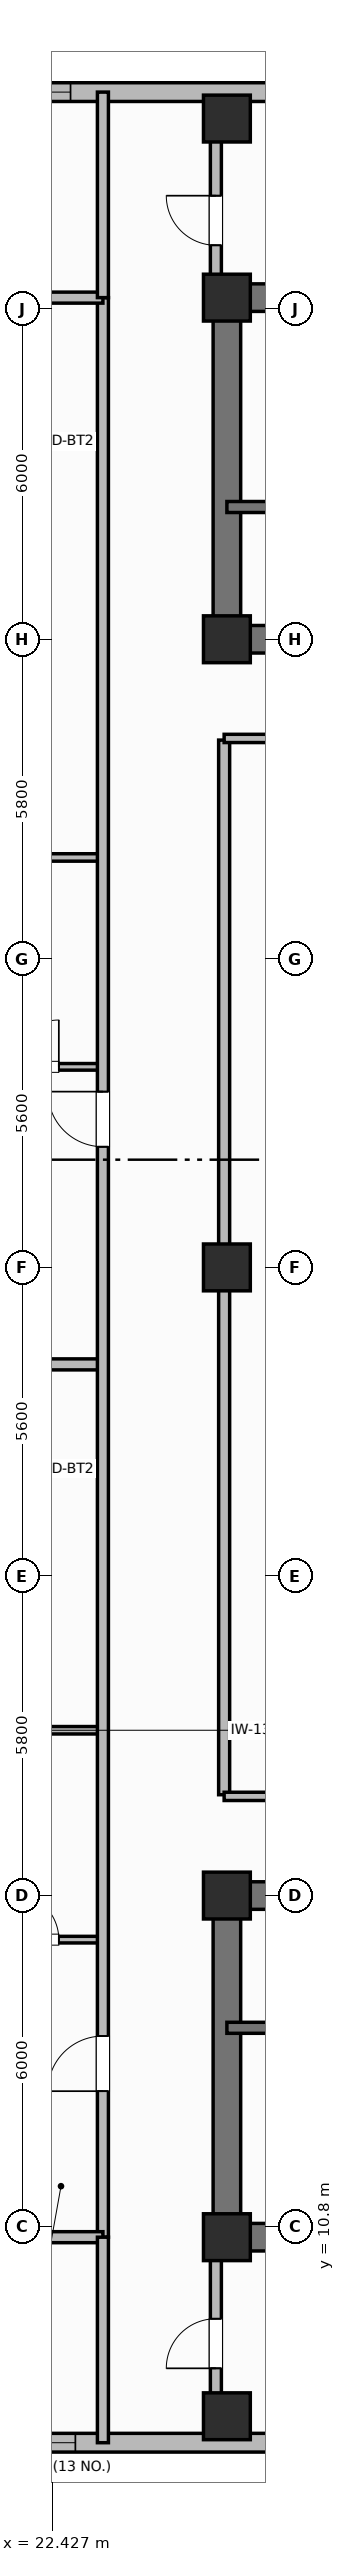
"""IFC4 building model, lengths in metres.
Left out: names, types, materials, properties, quantities, classifications, styles, units other than length and angle.
Written with IfcOpenShell. Run it as: python <this file> out.ifc"""

import sys

from ifc_helpers import new_model, si_unit, direction, frame, frame_2d, origin, origin_2d, place, context, subcontext, project, spatial, rectangle, extrude, element, fill, save


model = new_model("IFC4")
c1 = context("Model", 3, precision=1e-05, world=origin(), true_north=direction((0.0, 1.0)))
c2 = subcontext(c1, "Body", "Model", "MODEL_VIEW")
j1 = project(units=[si_unit("LENGTHUNIT", "METRE"), si_unit("PLANEANGLEUNIT", "RADIAN")], contexts=[c1])
p1 = place(None, origin())
s1 = spatial("IfcSite", under=j1, at=p1, CompositionType="ELEMENT")
p2 = place(p1, origin())
s2 = spatial("IfcBuilding", under=s1, at=p2, CompositionType="ELEMENT")
p3 = place(p2, frame((0.0, 0.0, 214.7)))
s3 = spatial("IfcBuildingStorey", under=s2, at=p3, CompositionType="ELEMENT", Elevation=214.7)
p4 = place(p3, frame((52.8, 10.6, 0.0), z_axis=(0.0, 0.0, 1.0), x_axis=(-1.0, 0.0, 0.0)))
e1 = element("IfcWall", 1, at=p4, inside=s3, PredefinedType="SHEAR", context=c2, shape_type="SweptSolid", body=[
    extrude(rectangle(XDim=27.2, YDim=0.5, at=frame_2d((13.6, 0.0))), origin(), (0.0, 0.0, 1.0), 3.7),
])
p5 = place(p3, frame((25.6, 10.85, 0.0), z_axis=(0.0, 0.0, 1.0), x_axis=(0.0, 1.0, 0.0)))
e2 = element("IfcWall", 2, at=p5, inside=s3, PredefinedType="SHEAR", context=c2, shape_type="SweptSolid", body=[
    extrude(rectangle(XDim=5.7, YDim=0.5, at=frame_2d((2.85, 0.0))), origin(), (0.0, 0.0, 1.0), 3.7),
])
p6 = place(p3, frame((25.6, 16.8, 0.0), z_axis=(0.0, 0.0, 1.0), x_axis=(1.0, 0.0, 0.0)))
e3 = element("IfcWall", 3, at=p6, inside=s3, PredefinedType="SHEAR", context=c2, shape_type="SweptSolid", body=[
    extrude(rectangle(XDim=27.2, YDim=0.5, at=frame_2d((13.6, 0.0))), origin(), (0.0, 0.0, 1.0), 3.7),
])
p7 = place(p6, frame((1.9, 0.0, 0.0)))
e4 = element("IfcOpeningElement", 4, at=p7, cuts=e3, PredefinedType="OPENING", context=c2, shape_type="SweptSolid", body=[
    extrude(rectangle(XDim=1.1, YDim=2.15, at=frame_2d((0.55, 1.075))), frame((0.0, 0.26, 0.0), z_axis=(0.0, -1.0, 0.0), x_axis=(1.0, 0.0, 0.0)), (0.0, 0.0, 1.0), 0.52),
])
p8 = place(p6, frame((13.0, 0.0, 0.0)))
e5 = element("IfcOpeningElement", 5, at=p8, cuts=e3, PredefinedType="OPENING", context=c2, shape_type="SweptSolid", body=[
    extrude(rectangle(XDim=1.2, YDim=2.15, at=frame_2d((0.6, 1.075))), frame((0.0, 0.26, 0.0), z_axis=(0.0, -1.0, 0.0), x_axis=(1.0, 0.0, 0.0)), (0.0, 0.0, 1.0), 0.52),
])
p9 = place(p6, frame((21.6, 0.0, 0.0)))
e6 = element("IfcOpeningElement", 6, at=p9, cuts=e3, PredefinedType="OPENING", context=c2, shape_type="SweptSolid", body=[
    extrude(rectangle(XDim=1.0, YDim=2.15, at=frame_2d((0.5, 1.075))), frame((0.0, 0.26, 0.0), z_axis=(0.0, -1.0, 0.0), x_axis=(1.0, 0.0, 0.0)), (0.0, 0.0, 1.0), 0.52),
])
p10 = place(p3, frame((25.6, 45.8, 0.0), z_axis=(0.0, 0.0, 1.0), x_axis=(1.0, 0.0, 0.0)))
e7 = element("IfcWall", 7, at=p10, inside=s3, PredefinedType="SHEAR", context=c2, shape_type="SweptSolid", body=[
    extrude(rectangle(XDim=27.2, YDim=0.5, at=frame_2d((13.6, 0.0))), origin(), (0.0, 0.0, 1.0), 3.7),
])
p11 = place(p3, frame((25.6, 39.85, 0.0), z_axis=(0.0, 0.0, 1.0), x_axis=(0.0, 1.0, 0.0)))
e8 = element("IfcWall", 8, at=p11, inside=s3, PredefinedType="SHEAR", context=c2, shape_type="SweptSolid", body=[
    extrude(rectangle(XDim=5.7, YDim=0.5, at=frame_2d((2.85, 0.0))), origin(), (0.0, 0.0, 1.0), 3.7),
])
p12 = place(p3, frame((52.8, 39.6, 0.0), z_axis=(0.0, 0.0, 1.0), x_axis=(-1.0, 0.0, 0.0)))
e9 = element("IfcWall", 9, at=p12, inside=s3, PredefinedType="SHEAR", context=c2, shape_type="SweptSolid", body=[
    extrude(rectangle(XDim=27.2, YDim=0.5, at=frame_2d((13.6, 0.0))), origin(), (0.0, 0.0, 1.0), 3.7),
])
p13 = place(p12, frame((24.2, 0.0, 0.0)))
e10 = element("IfcOpeningElement", 10, at=p13, cuts=e9, PredefinedType="OPENING", context=c2, shape_type="SweptSolid", body=[
    extrude(rectangle(XDim=1.1, YDim=2.15, at=frame_2d((0.55, 1.075))), frame((0.0, 0.26, 0.0), z_axis=(0.0, -1.0, 0.0), x_axis=(1.0, 0.0, 0.0)), (0.0, 0.0, 1.0), 0.52),
])
p14 = place(p12, frame((15.1, 0.0, 0.0)))
e11 = element("IfcOpeningElement", 11, at=p14, cuts=e9, PredefinedType="OPENING", context=c2, shape_type="SweptSolid", body=[
    extrude(rectangle(XDim=1.2, YDim=2.15, at=frame_2d((0.6, 1.075))), frame((0.0, 0.26, 0.0), z_axis=(0.0, -1.0, 0.0), x_axis=(1.0, 0.0, 0.0)), (0.0, 0.0, 1.0), 0.52),
])
p15 = place(p12, frame((11.6, 0.0, 0.0)))
e12 = element("IfcOpeningElement", 12, at=p15, cuts=e9, PredefinedType="OPENING", context=c2, shape_type="SweptSolid", body=[
    extrude(rectangle(XDim=0.9, YDim=2.1, at=frame_2d((0.45, 1.05))), frame((0.0, 0.26, 0.0), z_axis=(0.0, -1.0, 0.0), x_axis=(1.0, 0.0, 0.0)), (0.0, 0.0, 1.0), 0.52),
])
p16 = place(p12, frame((7.35, 0.0, 0.0)))
e13 = element("IfcOpeningElement", 13, at=p16, cuts=e9, PredefinedType="OPENING", context=c2, shape_type="SweptSolid", body=[
    extrude(rectangle(XDim=0.85, YDim=2.1, at=frame_2d((0.425, 1.05))), frame((0.0, 0.26, 0.0), z_axis=(0.0, -1.0, 0.0), x_axis=(1.0, 0.0, 0.0)), (0.0, 0.0, 1.0), 0.52),
])
p17 = place(p12, frame((4.2, 0.0, 0.0)))
e14 = element("IfcOpeningElement", 14, at=p17, cuts=e9, PredefinedType="OPENING", context=c2, shape_type="SweptSolid", body=[
    extrude(rectangle(XDim=1.3, YDim=2.2, at=frame_2d((0.65, 1.1))), frame((0.0, 0.26, 0.0), z_axis=(0.0, -1.0, 0.0), x_axis=(1.0, 0.0, 0.0)), (0.0, 0.0, 1.0), 0.52),
])
for number, where, z_axis, x_axis in (
    (15, (25.6, 10.6, 0.0), (0.0, 0.0, 1.0), (1.0, 0.0, 0.0)),
    (16, (25.6, 16.8, 0.0), (0.0, 0.0, 1.0), (1.0, 0.0, 0.0)),
    (17, (25.6, 39.6, 0.0), (0.0, 0.0, 1.0), (1.0, 0.0, 0.0)),
    (18, (25.6, 45.8, 0.0), (0.0, 0.0, 1.0), (1.0, 0.0, 0.0)),
    (19, (25.6, 28.2, 0.0), (0.0, 0.0, 1.0), (1.0, 0.0, 0.0)),
    (20, (25.6, 7.35, 0.0), (0.0, 0.0, 1.0), (1.0, 0.0, 0.0)),
    (21, (25.6, 49.05, 0.0), (0.0, 0.0, 1.0), (1.0, 0.0, 0.0)),
):
    element("IfcColumn", number, at=place(p3, frame(where, z_axis=z_axis, x_axis=x_axis)), inside=s3, PredefinedType="COLUMN", context=c2, shape_type="SweptSolid", body=[
        extrude(rectangle(XDim=0.85, YDim=0.85, at=origin_2d()), origin(), (0.0, 0.0, 1.0), 3.7),
    ])
p18 = place(p3, frame((20.2, 6.87, 0.0), z_axis=(0.0, 0.0, 1.0), x_axis=(1.0, 0.0, 0.0)))
e22 = element("IfcWall", 22, at=p18, inside=s3, PredefinedType="SOLIDWALL", context=c2, shape_type="SweptSolid", body=[
    extrude(rectangle(XDim=15.8, YDim=0.34, at=frame_2d((7.9, 0.0))), origin(), (0.0, 0.0, 1.0), 2.72),
])
p19 = place(p18, frame((1.55, 0.0, 0.95)))
e23 = element("IfcOpeningElement", 23, at=p19, cuts=e22, PredefinedType="OPENING", context=c2, shape_type="SweptSolid", body=[
    extrude(rectangle(XDim=1.1, YDim=1.65, at=frame_2d((0.55, 0.825))), frame((0.0, 0.18, 0.0), z_axis=(0.0, -1.0, 0.0), x_axis=(1.0, 0.0, 0.0)), (0.0, 0.0, 1.0), 0.36),
])
p20 = place(p18, frame((7.35, 0.0, 0.95)))
e24 = element("IfcOpeningElement", 24, at=p20, cuts=e22, PredefinedType="OPENING", context=c2, shape_type="SweptSolid", body=[
    extrude(rectangle(XDim=1.1, YDim=1.65, at=frame_2d((0.55, 0.825))), frame((0.0, 0.18, 0.0), z_axis=(0.0, -1.0, 0.0), x_axis=(1.0, 0.0, 0.0)), (0.0, 0.0, 1.0), 0.36),
])
p21 = place(p18, frame((11.3, 0.0, 0.95)))
e25 = element("IfcOpeningElement", 25, at=p21, cuts=e22, PredefinedType="OPENING", context=c2, shape_type="SweptSolid", body=[
    extrude(rectangle(XDim=1.1, YDim=1.65, at=frame_2d((0.55, 0.825))), frame((0.0, 0.18, 0.0), z_axis=(0.0, -1.0, 0.0), x_axis=(1.0, 0.0, 0.0)), (0.0, 0.0, 1.0), 0.36),
])
p22 = place(p3, frame((36.0, 49.53, 0.0), z_axis=(0.0, 0.0, 1.0), x_axis=(-1.0, 0.0, 0.0)))
e26 = element("IfcWall", 26, at=p22, inside=s3, PredefinedType="SOLIDWALL", context=c2, shape_type="SweptSolid", body=[
    extrude(rectangle(XDim=15.8, YDim=0.34, at=frame_2d((7.9, 0.0))), origin(), (0.0, 0.0, 1.0), 2.72),
])
p23 = place(p22, frame((2.363, 0.0, 0.7)))
e27 = element("IfcOpeningElement", 27, at=p23, cuts=e26, PredefinedType="OPENING", context=c2, shape_type="SweptSolid", body=[
    extrude(rectangle(XDim=1.6, YDim=1.9, at=frame_2d((0.8, 0.95))), frame((0.0, 0.18, 0.0), z_axis=(0.0, -1.0, 0.0), x_axis=(1.0, 0.0, 0.0)), (0.0, 0.0, 1.0), 0.36),
])
p24 = place(p22, frame((5.288, 0.0, 0.7)))
e28 = element("IfcOpeningElement", 28, at=p24, cuts=e26, PredefinedType="OPENING", context=c2, shape_type="SweptSolid", body=[
    extrude(rectangle(XDim=1.6, YDim=1.9, at=frame_2d((0.8, 0.95))), frame((0.0, 0.18, 0.0), z_axis=(0.0, -1.0, 0.0), x_axis=(1.0, 0.0, 0.0)), (0.0, 0.0, 1.0), 0.36),
])
p25 = place(p22, frame((13.238, 0.0, 0.7)))
e29 = element("IfcOpeningElement", 29, at=p25, cuts=e26, PredefinedType="OPENING", context=c2, shape_type="SweptSolid", body=[
    extrude(rectangle(XDim=1.6, YDim=1.9, at=frame_2d((0.8, 0.95))), frame((0.0, 0.18, 0.0), z_axis=(0.0, -1.0, 0.0), x_axis=(1.0, 0.0, 0.0)), (0.0, 0.0, 1.0), 0.36),
])
p26 = place(p3, frame((25.6, 14.4, 0.0), z_axis=(0.0, 0.0, 1.0), x_axis=(1.0, 0.0, 0.0)))
e30 = element("IfcWall", 30, at=p26, inside=s3, PredefinedType="SHEAR", context=c2, shape_type="SweptSolid", body=[
    extrude(rectangle(XDim=9.55, YDim=0.2, at=frame_2d((4.775, 0.0))), origin(), (0.0, 0.0, 1.0), 3.7),
])
p27 = place(p26, frame((1.05, 0.0, 0.0)))
e31 = element("IfcOpeningElement", 31, at=p27, cuts=e30, PredefinedType="OPENING", context=c2, shape_type="SweptSolid", body=[
    extrude(rectangle(XDim=1.1, YDim=2.15, at=frame_2d((0.55, 1.075))), frame((0.0, 0.11, 0.0), z_axis=(0.0, -1.0, 0.0), x_axis=(1.0, 0.0, 0.0)), (0.0, 0.0, 1.0), 0.22),
])
p28 = place(p3, frame((35.15, 42.0, 0.0), z_axis=(0.0, 0.0, 1.0), x_axis=(-1.0, 0.0, 0.0)))
e32 = element("IfcWall", 32, at=p28, inside=s3, PredefinedType="SHEAR", context=c2, shape_type="SweptSolid", body=[
    extrude(rectangle(XDim=9.55, YDim=0.2, at=frame_2d((4.775, 0.0))), origin(), (0.0, 0.0, 1.0), 3.7),
])
p29 = place(p28, frame((7.25, 0.0, 0.0)))
e33 = element("IfcOpeningElement", 33, at=p29, cuts=e32, PredefinedType="OPENING", context=c2, shape_type="SweptSolid", body=[
    extrude(rectangle(XDim=1.1, YDim=2.15, at=frame_2d((0.55, 1.075))), frame((0.0, 0.11, 0.0), z_axis=(0.0, -1.0, 0.0), x_axis=(1.0, 0.0, 0.0)), (0.0, 0.0, 1.0), 0.22),
])
p30 = place(p3, frame((25.55, 18.63, 0.0), z_axis=(0.0, 0.0, 1.0), x_axis=(0.0, 1.0, 0.0)))
e34 = element("IfcWall", 34, at=p30, inside=s3, PredefinedType="PARTITIONING", context=c2, shape_type="SweptSolid", body=[
    extrude(rectangle(XDim=19.14, YDim=0.2, at=frame_2d((9.57, 0.0))), origin(), (0.0, 0.0, 1.0), 2.55),
])
for number, where, z_axis, x_axis in (
    (35, (25.55, 18.6, 0.0), (0.0, 0.0, 1.0), (1.0, 0.0, 0.0)),
    (36, (25.55, 37.8, 0.0), (0.0, 0.0, 1.0), (1.0, 0.0, 0.0)),
):
    element("IfcWall", number, at=place(p3, frame(where, z_axis=z_axis, x_axis=x_axis)), inside=s3, PredefinedType="PARTITIONING", context=c2, shape_type="SweptSolid", body=[
        extrude(rectangle(XDim=22.2, YDim=0.15, at=frame_2d((11.1, 0.0))), origin(), (0.0, 0.0, 1.0), 2.55),
    ])
p31 = place(p3, frame((21.1, 16.0, 0.0), z_axis=(0.0, 0.0, 1.0), x_axis=(1.0, 0.0, 0.0)))
e37 = element("IfcWall", 37, at=p31, inside=s3, PredefinedType="PARTITIONING", context=c2, shape_type="SweptSolid", body=[
    extrude(rectangle(XDim=2.25, YDim=0.12, at=frame_2d((1.125, 0.0))), origin(), (0.0, 0.0, 1.0), 2.55),
])
p32 = place(p31, frame((0.6, 0.0, 0.0)))
e38 = element("IfcOpeningElement", 38, at=p32, cuts=e37, PredefinedType="OPENING", context=c2, shape_type="SweptSolid", body=[
    extrude(rectangle(XDim=0.85, YDim=2.1, at=frame_2d((0.425, 1.05))), frame((0.0, 0.07, 0.0), z_axis=(0.0, -1.0, 0.0), x_axis=(1.0, 0.0, 0.0)), (0.0, 0.0, 1.0), 0.14),
])
p33 = place(p3, frame((21.1, 19.8, 0.0), z_axis=(0.0, 0.0, 1.0), x_axis=(1.0, 0.0, 0.0)))
e39 = element("IfcWall", 39, at=p33, inside=s3, PredefinedType="PARTITIONING", context=c2, shape_type="SweptSolid", body=[
    extrude(rectangle(XDim=2.25, YDim=0.135, at=frame_2d((1.125, 0.0))), origin(), (0.0, 0.0, 1.0), 2.55),
])
p34 = place(p3, frame((17.016, 26.44, 0.0), z_axis=(0.0, 0.0, 1.0), x_axis=(1.0, 0.0, 0.0)))
e40 = element("IfcWall", 40, at=p34, inside=s3, PredefinedType="PARTITIONING", context=c2, shape_type="SweptSolid", body=[
    extrude(rectangle(XDim=6.334, YDim=0.2, at=frame_2d((3.167, 0.0))), origin(), (0.0, 0.0, 1.0), 2.55),
])
p35 = place(p3, frame((21.1, 31.84, 0.0), z_axis=(0.0, 0.0, 1.0), x_axis=(1.0, 0.0, 0.0)))
e41 = element("IfcWall", 41, at=p35, inside=s3, PredefinedType="PARTITIONING", context=c2, shape_type="SweptSolid", body=[
    extrude(rectangle(XDim=2.25, YDim=0.12, at=frame_2d((1.125, 0.0))), origin(), (0.0, 0.0, 1.0), 2.55),
])
p36 = place(p35, frame((0.6, 0.0, 0.0)))
e42 = element("IfcOpeningElement", 42, at=p36, cuts=e41, PredefinedType="OPENING", context=c2, shape_type="SweptSolid", body=[
    extrude(rectangle(XDim=0.85, YDim=2.1, at=frame_2d((0.425, 1.05))), frame((0.0, 0.07, 0.0), z_axis=(0.0, -1.0, 0.0), x_axis=(1.0, 0.0, 0.0)), (0.0, 0.0, 1.0), 0.14),
])
p37 = place(p3, frame((21.1, 35.64, 0.0), z_axis=(0.0, 0.0, 1.0), x_axis=(1.0, 0.0, 0.0)))
e43 = element("IfcWall", 43, at=p37, inside=s3, PredefinedType="PARTITIONING", context=c2, shape_type="SweptSolid", body=[
    extrude(rectangle(XDim=2.25, YDim=0.135, at=frame_2d((1.125, 0.0))), origin(), (0.0, 0.0, 1.0), 2.55),
])
p38 = place(p3, frame((23.35, 10.6, 0.0), z_axis=(0.0, 0.0, 1.0), x_axis=(0.0, 1.0, 0.0)))
e44 = element("IfcWall", 44, at=p38, inside=s3, PredefinedType="PARTITIONING", context=c2, shape_type="SweptSolid", body=[
    extrude(rectangle(XDim=35.2, YDim=0.2, at=frame_2d((17.6, 0.0))), origin(), (0.0, 0.0, 1.0), 2.55),
])
p39 = place(p38, frame((2.65, 0.0, 0.0)))
e45 = element("IfcOpeningElement", 45, at=p39, cuts=e44, PredefinedType="OPENING", context=c2, shape_type="SweptSolid", body=[
    extrude(rectangle(XDim=1.0, YDim=2.15, at=frame_2d((0.5, 1.075))), frame((0.0, 0.11, 0.0), z_axis=(0.0, -1.0, 0.0), x_axis=(1.0, 0.0, 0.0)), (0.0, 0.0, 1.0), 0.22),
])
p40 = place(p38, frame((19.79, 0.0, 0.0)))
e46 = element("IfcOpeningElement", 46, at=p40, cuts=e44, PredefinedType="OPENING", context=c2, shape_type="SweptSolid", body=[
    extrude(rectangle(XDim=1.0, YDim=2.15, at=frame_2d((0.5, 1.075))), frame((0.0, 0.11, 0.0), z_axis=(0.0, -1.0, 0.0), x_axis=(1.0, 0.0, 0.0)), (0.0, 0.0, 1.0), 0.22),
])
for number, where, z_axis, x_axis in (
    (47, (16.99, 10.6, 0.0), (0.0, 0.0, 1.0), (1.0, 0.0, 0.0)),
    (48, (16.99, 45.8, 0.0), (0.0, 0.0, 1.0), (1.0, 0.0, 0.0)),
):
    element("IfcWall", number, at=place(p3, frame(where, z_axis=z_axis, x_axis=x_axis)), inside=s3, PredefinedType="PARTITIONING", context=c2, shape_type="SweptSolid", body=[
        extrude(rectangle(XDim=6.36, YDim=0.2, at=frame_2d((3.18, 0.0))), origin(), (0.0, 0.0, 1.0), 2.55),
    ])
for number, where, z_axis, x_axis in (
    (49, (23.35, 6.87, 0.0), (0.0, 0.0, 1.0), (0.0, 1.0, 0.0)),
    (50, (23.35, 45.8, 0.0), (0.0, 0.0, 1.0), (0.0, 1.0, 0.0)),
):
    element("IfcWall", number, at=place(p3, frame(where, z_axis=z_axis, x_axis=x_axis)), inside=s3, PredefinedType="PARTITIONING", context=c2, shape_type="SweptSolid", body=[
        extrude(rectangle(XDim=3.73, YDim=0.2, at=frame_2d((1.865, 0.0))), origin(), (0.0, 0.0, 1.0), 2.55),
    ])
p41 = place(p3, frame((25.4, 7.57, 0.0), z_axis=(0.0, 0.0, 1.0), x_axis=(0.0, 1.0, 0.0)))
e51 = element("IfcWall", 51, at=p41, inside=s3, PredefinedType="PARTITIONING", context=c2, shape_type="SweptSolid", body=[
    extrude(rectangle(XDim=2.73, YDim=0.2, at=frame_2d((1.365, 0.0))), origin(), (0.0, 0.0, 1.0), 2.55),
])
p42 = place(p41, frame((0.65, 0.0, 0.0)))
e52 = element("IfcOpeningElement", 52, at=p42, cuts=e51, PredefinedType="OPENING", context=c2, shape_type="SweptSolid", body=[
    extrude(rectangle(XDim=0.9, YDim=2.1, at=frame_2d((0.45, 1.05))), frame((0.0, 0.11, 0.0), z_axis=(0.0, -1.0, 0.0), x_axis=(1.0, 0.0, 0.0)), (0.0, 0.0, 1.0), 0.22),
])
p43 = place(p3, frame((25.4, 46.1, 0.0), z_axis=(0.0, 0.0, 1.0), x_axis=(0.0, 1.0, 0.0)))
e53 = element("IfcWall", 53, at=p43, inside=s3, PredefinedType="PARTITIONING", context=c2, shape_type="SweptSolid", body=[
    extrude(rectangle(XDim=2.73, YDim=0.2, at=frame_2d((1.365, 0.0))), origin(), (0.0, 0.0, 1.0), 2.55),
])
p44 = place(p43, frame((0.65, 0.0, 0.0)))
e54 = element("IfcOpeningElement", 54, at=p44, cuts=e53, PredefinedType="OPENING", context=c2, shape_type="SweptSolid", body=[
    extrude(rectangle(XDim=0.9, YDim=2.1, at=frame_2d((0.45, 1.05))), frame((0.0, 0.11, 0.0), z_axis=(0.0, -1.0, 0.0), x_axis=(1.0, 0.0, 0.0)), (0.0, 0.0, 1.0), 0.22),
])
p45 = place(p19, origin())
e55 = element("IfcWindow", 55, at=p45, inside=s3, PartitioningType="SINGLE_PANEL", PredefinedType="WINDOW", context=c2, shape_type="SweptSolid", body=[
    extrude(rectangle(XDim=1.1, YDim=1.65, at=frame_2d((0.55, 0.825))), frame((0.0, 0.03, 0.0), z_axis=(0.0, -1.0, 0.0), x_axis=(1.0, 0.0, 0.0)), (0.0, 0.0, 1.0), 0.06),
])
fill(e23, e55)
p46 = place(p25, origin())
e56 = element("IfcWindow", 56, at=p46, inside=s3, PartitioningType="SINGLE_PANEL", PredefinedType="WINDOW", context=c2, shape_type="SweptSolid", body=[
    extrude(rectangle(XDim=1.6, YDim=1.9, at=frame_2d((0.8, 0.95))), frame((0.0, 0.03, 0.0), z_axis=(0.0, -1.0, 0.0), x_axis=(1.0, 0.0, 0.0)), (0.0, 0.0, 1.0), 0.06),
])
fill(e29, e56)
p47 = place(p32, origin())
e57 = element("IfcDoor", 57, at=p47, inside=s3, OperationType="SINGLE_SWING_LEFT", PredefinedType="DOOR", context=c2, shape_type="SweptSolid", body=[
    extrude(rectangle(XDim=0.85, YDim=2.1, at=frame_2d((0.425, 1.05))), frame((0.0, 0.025, 0.0), z_axis=(0.0, -1.0, 0.0), x_axis=(1.0, 0.0, 0.0)), (0.0, 0.0, 1.0), 0.05),
])
fill(e38, e57)
p48 = place(p36, origin())
e58 = element("IfcDoor", 58, at=p48, inside=s3, OperationType="SINGLE_SWING_RIGHT", PredefinedType="DOOR", context=c2, shape_type="SweptSolid", body=[
    extrude(rectangle(XDim=0.85, YDim=2.1, at=frame_2d((0.425, 1.05))), frame((0.0, 0.025, 0.0), z_axis=(0.0, -1.0, 0.0), x_axis=(1.0, 0.0, 0.0)), (0.0, 0.0, 1.0), 0.05),
])
fill(e42, e58)
p49 = place(p39, origin())
e59 = element("IfcDoor", 59, at=p49, inside=s3, OperationType="SINGLE_SWING_LEFT", PredefinedType="DOOR", context=c2, shape_type="SweptSolid", body=[
    extrude(rectangle(XDim=1.0, YDim=2.15, at=frame_2d((0.5, 1.075))), frame((0.0, 0.025, 0.0), z_axis=(0.0, -1.0, 0.0), x_axis=(1.0, 0.0, 0.0)), (0.0, 0.0, 1.0), 0.05),
])
fill(e45, e59)
p50 = place(p40, origin())
e60 = element("IfcDoor", 60, at=p50, inside=s3, OperationType="SINGLE_SWING_RIGHT", PredefinedType="DOOR", context=c2, shape_type="SweptSolid", body=[
    extrude(rectangle(XDim=1.0, YDim=2.15, at=frame_2d((0.5, 1.075))), frame((0.0, 0.025, 0.0), z_axis=(0.0, -1.0, 0.0), x_axis=(1.0, 0.0, 0.0)), (0.0, 0.0, 1.0), 0.05),
])
fill(e46, e60)
p51 = place(p42, origin())
e61 = element("IfcDoor", 61, at=p51, inside=s3, OperationType="SINGLE_SWING_LEFT", PredefinedType="DOOR", context=c2, shape_type="SweptSolid", body=[
    extrude(rectangle(XDim=0.9, YDim=2.1, at=frame_2d((0.45, 1.05))), frame((0.0, 0.025, 0.0), z_axis=(0.0, -1.0, 0.0), x_axis=(1.0, 0.0, 0.0)), (0.0, 0.0, 1.0), 0.05),
])
fill(e52, e61)
p52 = place(p44, origin())
e62 = element("IfcDoor", 62, at=p52, inside=s3, OperationType="SINGLE_SWING_RIGHT", PredefinedType="DOOR", context=c2, shape_type="SweptSolid", body=[
    extrude(rectangle(XDim=0.9, YDim=2.1, at=frame_2d((0.45, 1.05))), frame((0.0, 0.025, 0.0), z_axis=(0.0, -1.0, 0.0), x_axis=(1.0, 0.0, 0.0)), (0.0, 0.0, 1.0), 0.05),
])
fill(e54, e62)
save(model, sys.argv[1])
